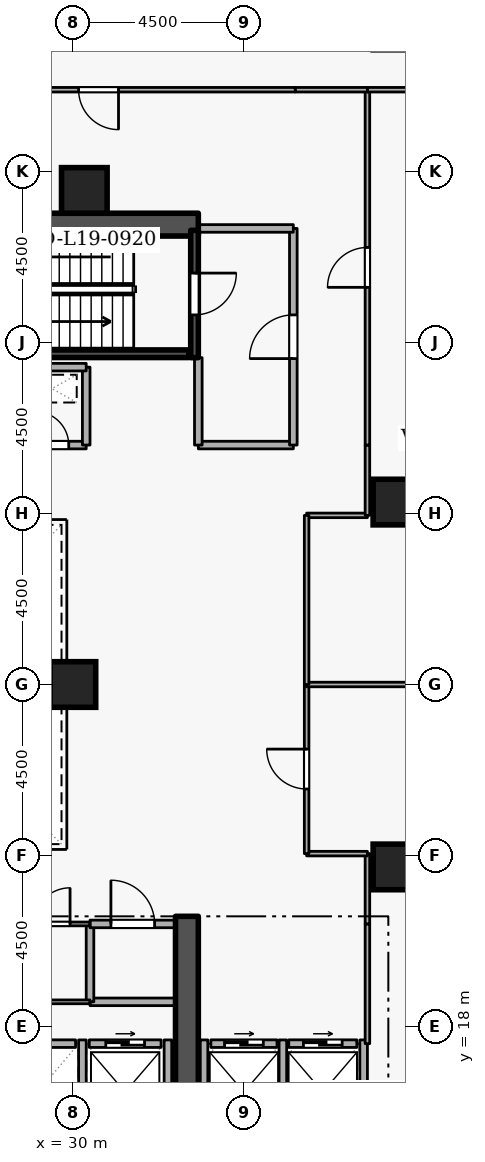
"""IFC4 building model, lengths in metres.
Left out: names, types, materials, properties, quantities, classifications, styles, units other than length and angle.
Written with IfcOpenShell. Run it as: python <this file> out.ifc"""

import sys

from ifc_helpers import new_model, si_unit, direction, frame, frame_2d, origin, origin_2d, place, context, subcontext, project, spatial, rectangle, extrude, element, fill, save


model = new_model("IFC4")
c1 = context("Model", 3, precision=1e-05, world=origin(), true_north=direction((0.0, 1.0)))
c2 = subcontext(c1, "Body", "Model", "MODEL_VIEW")
j1 = project(units=[si_unit("LENGTHUNIT", "METRE"), si_unit("PLANEANGLEUNIT", "RADIAN")], contexts=[c1])
p1 = place(None, origin())
s1 = spatial("IfcSite", under=j1, at=p1, CompositionType="ELEMENT")
p2 = place(p1, origin())
s2 = spatial("IfcBuilding", under=s1, at=p2, CompositionType="ELEMENT")
p3 = place(p2, frame((0.0, 0.0, 75.9)))
s3 = spatial("IfcBuildingStorey", under=s2, at=p3, CompositionType="ELEMENT", Elevation=75.9)
p4 = place(p3, frame((33.0, 15.2, 0.0), z_axis=(0.0, 0.0, 1.0), x_axis=(0.0, 1.0, 0.0)))
e1 = element("IfcWall", 1, at=p4, inside=s3, PredefinedType="SHEAR", context=c2, shape_type="SweptSolid", body=[
    extrude(rectangle(XDim=5.7, YDim=0.6, at=frame_2d((2.85, 0.0))), origin(), (0.0, 0.0, 1.0), 4.2),
])
p5 = place(p3, frame((17.7, 39.1, 0.0), z_axis=(0.0, 0.0, 1.0), x_axis=(1.0, 0.0, 0.0)))
e2 = element("IfcWall", 2, at=p5, inside=s3, PredefinedType="SHEAR", context=c2, shape_type="SweptSolid", body=[
    extrude(rectangle(XDim=15.6, YDim=0.6, at=frame_2d((7.8, 0.0))), origin(), (0.0, 0.0, 1.0), 4.2),
])
for number, where, z_axis, x_axis in (
    (3, (38.5, 22.2, 0.0), (0.0, 0.0, 1.0), (1.0, 0.0, 0.0)),
    (4, (38.5, 31.8, 0.0), (0.0, 0.0, 1.0), (1.0, 0.0, 0.0)),
    (5, (30.3, 40.0, 0.0), (0.0, 0.0, 1.0), (1.0, 0.0, 0.0)),
    (6, (30.0, 27.0, 0.0), (0.0, 0.0, 1.0), (1.0, 0.0, 0.0)),
):
    element("IfcColumn", number, at=place(p3, frame(where, z_axis=z_axis, x_axis=x_axis)), inside=s3, PredefinedType="COLUMN", context=c2, shape_type="SweptSolid", body=[
        extrude(rectangle(XDim=1.2, YDim=1.2, at=origin_2d()), origin(), (0.0, 0.0, 1.0), 4.2),
    ])
p6 = place(p3, frame((28.08, 17.55, 0.0), z_axis=(0.0, 0.0, 1.0), x_axis=(1.0, 0.0, 0.0)))
e7 = element("IfcWall", 7, at=p6, inside=s3, PredefinedType="STANDARD", context=c2, shape_type="SweptSolid", body=[
    extrude(rectangle(XDim=1.99, YDim=0.2, at=frame_2d((0.995, 0.0))), origin(), (0.0, 0.0, 1.0), 3.94),
])
p7 = place(p3, frame((30.43, 17.55, 0.0), z_axis=(0.0, 0.0, 1.0), x_axis=(1.0, 0.0, 0.0)))
e8 = element("IfcWall", 8, at=p7, inside=s3, PredefinedType="STANDARD", context=c2, shape_type="SweptSolid", body=[
    extrude(rectangle(XDim=1.89, YDim=0.2, at=frame_2d((0.945, 0.0))), origin(), (0.0, 0.0, 1.0), 3.94),
])
p8 = place(p7, frame((0.435, 0.0, 0.0)))
e9 = element("IfcOpeningElement", 9, at=p8, cuts=e8, PredefinedType="OPENING", context=c2, shape_type="SweptSolid", body=[
    extrude(rectangle(XDim=1.02, YDim=2.06, at=frame_2d((0.51, 1.03))), frame((0.0, 0.11, 0.0), z_axis=(0.0, -1.0, 0.0), x_axis=(1.0, 0.0, 0.0)), (0.0, 0.0, 1.0), 0.22),
])
p9 = place(p3, frame((33.63, 17.55, 0.0), z_axis=(0.0, 0.0, 1.0), x_axis=(1.0, 0.0, 0.0)))
e10 = element("IfcWall", 10, at=p9, inside=s3, PredefinedType="STANDARD", context=c2, shape_type="SweptSolid", body=[
    extrude(rectangle(XDim=1.74, YDim=0.2, at=frame_2d((0.87, 0.0))), origin(), (0.0, 0.0, 1.0), 3.94),
])
p10 = place(p9, frame((0.36, 0.0, 0.0)))
e11 = element("IfcOpeningElement", 11, at=p10, cuts=e10, PredefinedType="OPENING", context=c2, shape_type="SweptSolid", body=[
    extrude(rectangle(XDim=1.02, YDim=2.06, at=frame_2d((0.51, 1.03))), frame((0.0, 0.11, 0.0), z_axis=(0.0, -1.0, 0.0), x_axis=(1.0, 0.0, 0.0)), (0.0, 0.0, 1.0), 0.22),
])
p11 = place(p3, frame((35.68, 17.55, 0.0), z_axis=(0.0, 0.0, 1.0), x_axis=(1.0, 0.0, 0.0)))
e12 = element("IfcWall", 12, at=p11, inside=s3, PredefinedType="STANDARD", context=c2, shape_type="SweptSolid", body=[
    extrude(rectangle(XDim=1.79, YDim=0.2, at=frame_2d((0.895, 0.0))), origin(), (0.0, 0.0, 1.0), 3.94),
])
p12 = place(p11, frame((0.385, 0.0, 0.0)))
e13 = element("IfcOpeningElement", 13, at=p12, cuts=e12, PredefinedType="OPENING", context=c2, shape_type="SweptSolid", body=[
    extrude(rectangle(XDim=1.02, YDim=2.06, at=frame_2d((0.51, 1.03))), frame((0.0, 0.11, 0.0), z_axis=(0.0, -1.0, 0.0), x_axis=(1.0, 0.0, 0.0)), (0.0, 0.0, 1.0), 0.22),
])
for number, where, z_axis, x_axis in (
    (14, (30.25, 15.212, 0.0), (0.0, 0.0, 1.0), (0.0, 1.0, 0.0)),
    (15, (32.5, 15.212, 0.0), (0.0, 0.0, 1.0), (0.0, 1.0, 0.0)),
):
    element("IfcWall", number, at=place(p3, frame(where, z_axis=z_axis, x_axis=x_axis)), inside=s3, PredefinedType="STANDARD", context=c2, shape_type="SweptSolid", body=[
        extrude(rectangle(XDim=2.436, YDim=0.2, at=frame_2d((1.218, 0.0))), origin(), (0.0, 0.0, 1.0), 3.94),
    ])
for number, where, z_axis, x_axis in (
    (16, (35.525, 15.012, 0.0), (0.0, 0.0, 1.0), (0.0, 1.0, 0.0)),
    (17, (33.45, 15.012, 0.0), (0.0, 0.0, 1.0), (0.0, 1.0, 0.0)),
    (18, (37.65, 15.012, 0.0), (0.0, 0.0, 1.0), (0.0, 1.0, 0.0)),
):
    element("IfcWall", number, at=place(p3, frame(where, z_axis=z_axis, x_axis=x_axis)), inside=s3, PredefinedType="STANDARD", context=c2, shape_type="SweptSolid", body=[
        extrude(rectangle(XDim=2.636, YDim=0.2, at=frame_2d((1.318, 0.0))), origin(), (0.0, 0.0, 1.0), 3.94),
    ])
p13 = place(p3, frame((33.2, 38.95, 0.0), z_axis=(0.0, 0.0, 1.0), x_axis=(0.0, -1.0, 0.0)))
e19 = element("IfcWall", 19, at=p13, inside=s3, PredefinedType="SHEAR", context=c2, shape_type="SweptSolid", body=[
    extrude(rectangle(XDim=3.35, YDim=0.2, at=frame_2d((1.675, 0.0))), origin(), (0.0, 0.0, 1.0), 4.2),
])
p14 = place(p13, frame((1.125, 0.0, 0.0)))
e20 = element("IfcOpeningElement", 20, at=p14, cuts=e19, PredefinedType="OPENING", context=c2, shape_type="SweptSolid", body=[
    extrude(rectangle(XDim=1.1, YDim=2.1, at=frame_2d((0.55, 1.05))), frame((0.0, 0.11, 0.0), z_axis=(0.0, -1.0, 0.0), x_axis=(1.0, 0.0, 0.0)), (0.0, 0.0, 1.0), 0.22),
])
p15 = place(p3, frame((25.95, 35.703, 0.0), z_axis=(0.0, 0.0, 1.0), x_axis=(1.0, 0.0, 0.0)))
e21 = element("IfcWall", 21, at=p15, inside=s3, PredefinedType="SHEAR", context=c2, shape_type="SweptSolid", body=[
    extrude(rectangle(XDim=7.1, YDim=0.2, at=frame_2d((3.55, 0.0))), origin(), (0.0, 0.0, 1.0), 4.2),
])
p16 = place(p3, frame((33.3, 33.3, 0.0), z_axis=(0.0, 0.0, 1.0), x_axis=(1.0, 0.0, 0.0)))
e22 = element("IfcWall", 22, at=p16, inside=s3, PredefinedType="STANDARD", context=c2, shape_type="SweptSolid", body=[
    extrude(rectangle(XDim=2.5, YDim=0.2, at=frame_2d((1.25, 0.0))), origin(), (0.0, 0.0, 1.0), 3.94),
])
p17 = place(p3, frame((35.8, 33.3, 0.0), z_axis=(0.0, 0.0, 1.0), x_axis=(0.0, 1.0, 0.0)))
e23 = element("IfcWall", 23, at=p17, inside=s3, PredefinedType="STANDARD", context=c2, shape_type="SweptSolid", body=[
    extrude(rectangle(XDim=5.7, YDim=0.2, at=frame_2d((2.85, 0.0))), origin(), (0.0, 0.0, 1.0), 3.94),
])
p18 = place(p17, frame((2.275, 0.0, 0.0)))
e24 = element("IfcOpeningElement", 24, at=p18, cuts=e23, PredefinedType="OPENING", context=c2, shape_type="SweptSolid", body=[
    extrude(rectangle(XDim=1.15, YDim=2.1, at=frame_2d((0.575, 1.05))), frame((0.0, 0.11, 0.0), z_axis=(0.0, -1.0, 0.0), x_axis=(1.0, 0.0, 0.0)), (0.0, 0.0, 1.0), 0.22),
])
p19 = place(p3, frame((35.8, 39.0, 0.0), z_axis=(0.0, 0.0, 1.0), x_axis=(-1.0, 0.0, 0.0)))
e25 = element("IfcWall", 25, at=p19, inside=s3, PredefinedType="STANDARD", context=c2, shape_type="SweptSolid", body=[
    extrude(rectangle(XDim=2.5, YDim=0.2, at=frame_2d((1.25, 0.0))), origin(), (0.0, 0.0, 1.0), 3.94),
])
p20 = place(p3, frame((33.3, 35.6, 0.0), z_axis=(0.0, 0.0, 1.0), x_axis=(0.0, -1.0, 0.0)))
e26 = element("IfcWall", 26, at=p20, inside=s3, PredefinedType="STANDARD", context=c2, shape_type="SweptSolid", body=[
    extrude(rectangle(XDim=2.3, YDim=0.2, at=frame_2d((1.15, 0.0))), origin(), (0.0, 0.0, 1.0), 3.145),
])
p21 = place(p3, frame((28.55, 33.3, 0.0), z_axis=(0.0, 0.0, 1.0), x_axis=(1.0, 0.0, 0.0)))
e27 = element("IfcWall", 27, at=p21, inside=s3, PredefinedType="STANDARD", context=c2, shape_type="SweptSolid", body=[
    extrude(rectangle(XDim=1.8, YDim=0.2, at=frame_2d((0.9, 0.0))), origin(), (0.0, 0.0, 1.0), 3.94),
])
p22 = place(p21, frame((0.46, 0.0, 0.0)))
e28 = element("IfcOpeningElement", 28, at=p22, cuts=e27, PredefinedType="OPENING", context=c2, shape_type="SweptSolid", body=[
    extrude(rectangle(XDim=0.88, YDim=2.04, at=frame_2d((0.44, 1.02))), frame((0.0, 0.11, 0.0), z_axis=(0.0, -1.0, 0.0), x_axis=(1.0, 0.0, 0.0)), (0.0, 0.0, 1.0), 0.22),
])
p23 = place(p3, frame((30.35, 33.3, 0.0), z_axis=(0.0, 0.0, 1.0), x_axis=(0.0, 1.0, 0.0)))
e29 = element("IfcWall", 29, at=p23, inside=s3, PredefinedType="STANDARD", context=c2, shape_type="SweptSolid", body=[
    extrude(rectangle(XDim=2.05, YDim=0.2, at=frame_2d((1.025, 0.0))), origin(), (0.0, 0.0, 1.0), 3.94),
])
p24 = place(p3, frame((30.35, 35.35, 0.0), z_axis=(0.0, 0.0, 1.0), x_axis=(-1.0, 0.0, 0.0)))
e30 = element("IfcWall", 30, at=p24, inside=s3, PredefinedType="STANDARD", context=c2, shape_type="SweptSolid", body=[
    extrude(rectangle(XDim=1.8, YDim=0.2, at=frame_2d((0.9, 0.0))), origin(), (0.0, 0.0, 1.0), 3.94),
])
p25 = place(p3, frame((32.7, 18.65, 0.0), z_axis=(0.0, 0.0, 1.0), x_axis=(-1.0, 0.0, 0.0)))
e31 = element("IfcWall", 31, at=p25, inside=s3, PredefinedType="STANDARD", context=c2, shape_type="SweptSolid", body=[
    extrude(rectangle(XDim=2.25, YDim=0.2, at=frame_2d((1.125, 0.0))), origin(), (0.0, 0.0, 1.0), 3.94),
])
p26 = place(p3, frame((30.45, 18.65, 0.0), z_axis=(0.0, 0.0, 1.0), x_axis=(0.0, 1.0, 0.0)))
e32 = element("IfcWall", 32, at=p26, inside=s3, PredefinedType="STANDARD", context=c2, shape_type="SweptSolid", body=[
    extrude(rectangle(XDim=2.05, YDim=0.2, at=frame_2d((1.025, 0.0))), origin(), (0.0, 0.0, 1.0), 3.94),
])
p27 = place(p3, frame((30.45, 20.7, 0.0), z_axis=(0.0, 0.0, 1.0), x_axis=(1.0, 0.0, 0.0)))
e33 = element("IfcWall", 33, at=p27, inside=s3, PredefinedType="STANDARD", context=c2, shape_type="SweptSolid", body=[
    extrude(rectangle(XDim=2.25, YDim=0.2, at=frame_2d((1.125, 0.0))), origin(), (0.0, 0.0, 1.0), 3.94),
])
p28 = place(p27, frame((0.55, 0.0, 0.0)))
e34 = element("IfcOpeningElement", 34, at=p28, cuts=e33, PredefinedType="OPENING", context=c2, shape_type="SweptSolid", body=[
    extrude(rectangle(XDim=1.15, YDim=2.1, at=frame_2d((0.575, 1.05))), frame((0.0, 0.11, 0.0), z_axis=(0.0, -1.0, 0.0), x_axis=(1.0, 0.0, 0.0)), (0.0, 0.0, 1.0), 0.22),
])
p29 = place(p3, frame((30.45, 18.65, 0.0), z_axis=(0.0, 0.0, 1.0), x_axis=(-1.0, 0.0, 0.0)))
e35 = element("IfcWall", 35, at=p29, inside=s3, PredefinedType="PARTITIONING", context=c2, shape_type="SweptSolid", body=[
    extrude(rectangle(XDim=2.0, YDim=0.1, at=frame_2d((1.0, 0.0))), origin(), (0.0, 0.0, 1.0), 3.94),
])
p30 = place(p3, frame((28.45, 20.7, 0.0), z_axis=(0.0, 0.0, 1.0), x_axis=(1.0, 0.0, 0.0)))
e36 = element("IfcWall", 36, at=p30, inside=s3, PredefinedType="PARTITIONING", context=c2, shape_type="SweptSolid", body=[
    extrude(rectangle(XDim=2.0, YDim=0.1, at=frame_2d((1.0, 0.0))), origin(), (0.0, 0.0, 1.0), 3.94),
])
p31 = place(p30, frame((0.525, 0.0, 0.0)))
e37 = element("IfcOpeningElement", 37, at=p31, cuts=e36, PredefinedType="OPENING", context=c2, shape_type="SweptSolid", body=[
    extrude(rectangle(XDim=0.95, YDim=2.1, at=frame_2d((0.475, 1.05))), frame((0.0, 0.06, 0.0), z_axis=(0.0, -1.0, 0.0), x_axis=(1.0, 0.0, 0.0)), (0.0, 0.0, 1.0), 0.12),
])
p32 = place(p3, frame((37.75, 17.55, 0.0), z_axis=(0.0, 0.0, 1.0), x_axis=(0.0, 1.0, 0.0)))
e38 = element("IfcWall", 38, at=p32, inside=s3, PredefinedType="PARTITIONING", context=c2, shape_type="SweptSolid", body=[
    extrude(rectangle(XDim=3.15, YDim=0.12, at=frame_2d((1.575, 0.0))), origin(), (0.0, 0.0, 1.0), 3.94),
])
p33 = place(p3, frame((37.75, 20.7, 0.0), z_axis=(0.0, 0.0, 1.0), x_axis=(0.0, 1.0, 0.0)))
e39 = element("IfcWall", 39, at=p33, inside=s3, PredefinedType="PARTITIONING", context=c2, shape_type="SweptSolid", body=[
    extrude(rectangle(XDim=1.85, YDim=0.12, at=frame_2d((0.925, 0.0))), origin(), (0.0, 0.0, 1.0), 3.94),
])
p34 = place(p3, frame((37.75, 22.55, 0.0), z_axis=(0.0, 0.0, 1.0), x_axis=(-1.0, 0.0, 0.0)))
e40 = element("IfcWall", 40, at=p34, inside=s3, PredefinedType="PARTITIONING", context=c2, shape_type="SweptSolid", body=[
    extrude(rectangle(XDim=1.6, YDim=0.12, at=frame_2d((0.8, 0.0))), origin(), (0.0, 0.0, 1.0), 3.94),
])
p35 = place(p3, frame((36.15, 22.55, 0.0), z_axis=(0.0, 0.0, 1.0), x_axis=(0.0, 1.0, 0.0)))
e41 = element("IfcWall", 41, at=p35, inside=s3, PredefinedType="PARTITIONING", context=c2, shape_type="SweptSolid", body=[
    extrude(rectangle(XDim=4.45, YDim=0.12, at=frame_2d((2.225, 0.0))), origin(), (0.0, 0.0, 1.0), 3.94),
])
p36 = place(p35, frame((1.7, 0.0, 0.0)))
e42 = element("IfcOpeningElement", 42, at=p36, cuts=e41, PredefinedType="OPENING", context=c2, shape_type="SweptSolid", body=[
    extrude(rectangle(XDim=1.05, YDim=2.1, at=frame_2d((0.525, 1.05))), frame((0.0, 0.07, 0.0), z_axis=(0.0, -1.0, 0.0), x_axis=(1.0, 0.0, 0.0)), (0.0, 0.0, 1.0), 0.14),
])
p37 = place(p3, frame((36.15, 27.0, 0.0), z_axis=(0.0, 0.0, 1.0), x_axis=(1.0, 0.0, 0.0)))
e43 = element("IfcWall", 43, at=p37, inside=s3, PredefinedType="PARTITIONING", context=c2, shape_type="SweptSolid", body=[
    extrude(rectangle(XDim=13.27, YDim=0.12, at=frame_2d((6.635, 0.0))), origin(), (0.0, 0.0, 1.0), 3.482),
])
p38 = place(p3, frame((36.15, 31.45, 0.0), z_axis=(0.0, 0.0, 1.0), x_axis=(1.0, 0.0, 0.0)))
e44 = element("IfcWall", 44, at=p38, inside=s3, PredefinedType="PARTITIONING", context=c2, shape_type="SweptSolid", body=[
    extrude(rectangle(XDim=1.6, YDim=0.12, at=frame_2d((0.8, 0.0))), origin(), (0.0, 0.0, 1.0), 3.94),
])
p39 = place(p3, frame((37.75, 31.45, 0.0), z_axis=(0.0, 0.0, 1.0), x_axis=(0.0, 1.0, 0.0)))
e45 = element("IfcWall", 45, at=p39, inside=s3, PredefinedType="PARTITIONING", context=c2, shape_type="SweptSolid", body=[
    extrude(rectangle(XDim=1.85, YDim=0.12, at=frame_2d((0.925, 0.0))), origin(), (0.0, 0.0, 1.0), 3.94),
])
p40 = place(p3, frame((37.75, 33.3, 0.0), z_axis=(0.0, 0.0, 1.0), x_axis=(0.0, 1.0, 0.0)))
e46 = element("IfcWall", 46, at=p40, inside=s3, PredefinedType="PARTITIONING", context=c2, shape_type="SweptSolid", body=[
    extrude(rectangle(XDim=9.35, YDim=0.12, at=frame_2d((4.675, 0.0))), origin(), (0.0, 0.0, 1.0), 3.94),
])
p41 = place(p40, frame((4.15, 0.0, 0.0)))
e47 = element("IfcOpeningElement", 47, at=p41, cuts=e46, PredefinedType="OPENING", context=c2, shape_type="SweptSolid", body=[
    extrude(rectangle(XDim=1.05, YDim=2.1, at=frame_2d((0.525, 1.05))), frame((0.0, 0.07, 0.0), z_axis=(0.0, -1.0, 0.0), x_axis=(1.0, 0.0, 0.0)), (0.0, 0.0, 1.0), 0.14),
])
p42 = place(p3, frame((37.75, 42.65, 0.0), z_axis=(0.0, 0.0, 1.0), x_axis=(1.0, 0.0, 0.0)))
e48 = element("IfcWall", 48, at=p42, inside=s3, PredefinedType="PARTITIONING", context=c2, shape_type="SweptSolid", body=[
    extrude(rectangle(XDim=11.67, YDim=0.12, at=frame_2d((5.835, 0.0))), origin(), (0.0, 0.0, 1.0), 3.94),
])
p43 = place(p3, frame((36.15, 27.0, 0.0), z_axis=(0.0, 0.0, 1.0), x_axis=(0.0, 1.0, 0.0)))
e49 = element("IfcWall", 49, at=p43, inside=s3, PredefinedType="PARTITIONING", context=c2, shape_type="SweptSolid", body=[
    extrude(rectangle(XDim=4.45, YDim=0.12, at=frame_2d((2.225, 0.0))), origin(), (0.0, 0.0, 1.0), 3.94),
])
p44 = place(p3, frame((37.75, 42.65, 0.0), z_axis=(0.0, 0.0, 1.0), x_axis=(-1.0, 0.0, 0.0)))
e50 = element("IfcWall", 50, at=p44, inside=s3, PredefinedType="PARTITIONING", context=c2, shape_type="SweptSolid", body=[
    extrude(rectangle(XDim=1.9, YDim=0.12, at=frame_2d((0.95, 0.0))), origin(), (0.0, 0.0, 1.0), 3.495),
])
p45 = place(p3, frame((35.85, 42.65, 0.0), z_axis=(0.0, 0.0, 1.0), x_axis=(-1.0, 0.0, 0.0)))
e51 = element("IfcWall", 51, at=p45, inside=s3, PredefinedType="PARTITIONING", context=c2, shape_type="SweptSolid", body=[
    extrude(rectangle(XDim=10.35, YDim=0.12, at=frame_2d((5.175, 0.0))), origin(), (0.0, 0.0, 1.0), 3.495),
])
p46 = place(p45, frame((4.65, 0.0, 0.0)))
e52 = element("IfcOpeningElement", 52, at=p46, cuts=e51, PredefinedType="OPENING", context=c2, shape_type="SweptSolid", body=[
    extrude(rectangle(XDim=1.05, YDim=2.1, at=frame_2d((0.525, 1.05))), frame((0.0, 0.07, 0.0), z_axis=(0.0, -1.0, 0.0), x_axis=(1.0, 0.0, 0.0)), (0.0, 0.0, 1.0), 0.14),
])
p47 = place(p8, origin())
e53 = element("IfcDoor", 53, at=p47, inside=s3, OperationType="SLIDING_TO_LEFT", PredefinedType="DOOR", context=c2, shape_type="SweptSolid", body=[
    extrude(rectangle(XDim=1.02, YDim=2.06, at=frame_2d((0.51, 1.03))), frame((0.0, 0.025, 0.0), z_axis=(0.0, -1.0, 0.0), x_axis=(1.0, 0.0, 0.0)), (0.0, 0.0, 1.0), 0.05),
])
fill(e9, e53)
p48 = place(p10, origin())
e54 = element("IfcDoor", 54, at=p48, inside=s3, OperationType="SLIDING_TO_LEFT", PredefinedType="DOOR", context=c2, shape_type="SweptSolid", body=[
    extrude(rectangle(XDim=1.02, YDim=2.06, at=frame_2d((0.51, 1.03))), frame((0.0, 0.025, 0.0), z_axis=(0.0, -1.0, 0.0), x_axis=(1.0, 0.0, 0.0)), (0.0, 0.0, 1.0), 0.05),
])
fill(e11, e54)
p49 = place(p12, origin())
e55 = element("IfcDoor", 55, at=p49, inside=s3, OperationType="SLIDING_TO_LEFT", PredefinedType="DOOR", context=c2, shape_type="SweptSolid", body=[
    extrude(rectangle(XDim=1.02, YDim=2.06, at=frame_2d((0.51, 1.03))), frame((0.0, 0.025, 0.0), z_axis=(0.0, -1.0, 0.0), x_axis=(1.0, 0.0, 0.0)), (0.0, 0.0, 1.0), 0.05),
])
fill(e13, e55)
p50 = place(p14, origin())
e56 = element("IfcDoor", 56, at=p50, inside=s3, OperationType="SINGLE_SWING_LEFT", PredefinedType="DOOR", context=c2, shape_type="SweptSolid", body=[
    extrude(rectangle(XDim=1.1, YDim=2.1, at=frame_2d((0.55, 1.05))), frame((0.0, 0.025, 0.0), z_axis=(0.0, -1.0, 0.0), x_axis=(1.0, 0.0, 0.0)), (0.0, 0.0, 1.0), 0.05),
])
fill(e20, e56)
p51 = place(p18, origin())
e57 = element("IfcDoor", 57, at=p51, inside=s3, OperationType="SINGLE_SWING_LEFT", PredefinedType="DOOR", context=c2, shape_type="SweptSolid", body=[
    extrude(rectangle(XDim=1.15, YDim=2.1, at=frame_2d((0.575, 1.05))), frame((0.0, 0.025, 0.0), z_axis=(0.0, -1.0, 0.0), x_axis=(1.0, 0.0, 0.0)), (0.0, 0.0, 1.0), 0.05),
])
fill(e24, e57)
p52 = place(p22, origin())
e58 = element("IfcDoor", 58, at=p52, inside=s3, OperationType="SINGLE_SWING_LEFT", PredefinedType="DOOR", context=c2, shape_type="SweptSolid", body=[
    extrude(rectangle(XDim=0.88, YDim=2.04, at=frame_2d((0.44, 1.02))), frame((0.0, 0.025, 0.0), z_axis=(0.0, -1.0, 0.0), x_axis=(1.0, 0.0, 0.0)), (0.0, 0.0, 1.0), 0.05),
])
fill(e28, e58)
p53 = place(p31, origin())
e59 = element("IfcDoor", 59, at=p53, inside=s3, OperationType="SINGLE_SWING_RIGHT", PredefinedType="DOOR", context=c2, shape_type="SweptSolid", body=[
    extrude(rectangle(XDim=0.95, YDim=2.1, at=frame_2d((0.475, 1.05))), frame((0.0, 0.025, 0.0), z_axis=(0.0, -1.0, 0.0), x_axis=(1.0, 0.0, 0.0)), (0.0, 0.0, 1.0), 0.05),
])
fill(e37, e59)
p54 = place(p28, origin())
e60 = element("IfcDoor", 60, at=p54, inside=s3, OperationType="SINGLE_SWING_LEFT", PredefinedType="DOOR", context=c2, shape_type="SweptSolid", body=[
    extrude(rectangle(XDim=1.15, YDim=2.1, at=frame_2d((0.575, 1.05))), frame((0.0, 0.025, 0.0), z_axis=(0.0, -1.0, 0.0), x_axis=(1.0, 0.0, 0.0)), (0.0, 0.0, 1.0), 0.05),
])
fill(e34, e60)
p55 = place(p36, origin())
e61 = element("IfcDoor", 61, at=p55, inside=s3, OperationType="SINGLE_SWING_RIGHT", PredefinedType="DOOR", context=c2, shape_type="SweptSolid", body=[
    extrude(rectangle(XDim=1.05, YDim=2.1, at=frame_2d((0.525, 1.05))), frame((0.0, 0.025, 0.0), z_axis=(0.0, -1.0, 0.0), x_axis=(1.0, 0.0, 0.0)), (0.0, 0.0, 1.0), 0.05),
])
fill(e42, e61)
p56 = place(p41, origin())
e62 = element("IfcDoor", 62, at=p56, inside=s3, OperationType="SINGLE_SWING_LEFT", PredefinedType="DOOR", context=c2, shape_type="SweptSolid", body=[
    extrude(rectangle(XDim=1.05, YDim=2.1, at=frame_2d((0.525, 1.05))), frame((0.0, 0.025, 0.0), z_axis=(0.0, -1.0, 0.0), x_axis=(1.0, 0.0, 0.0)), (0.0, 0.0, 1.0), 0.05),
])
fill(e47, e62)
p57 = place(p46, origin())
e63 = element("IfcDoor", 63, at=p57, inside=s3, OperationType="SINGLE_SWING_LEFT", PredefinedType="DOOR", context=c2, shape_type="SweptSolid", body=[
    extrude(rectangle(XDim=1.05, YDim=2.1, at=frame_2d((0.525, 1.05))), frame((0.0, 0.025, 0.0), z_axis=(0.0, -1.0, 0.0), x_axis=(1.0, 0.0, 0.0)), (0.0, 0.0, 1.0), 0.05),
])
fill(e52, e63)
save(model, sys.argv[1])
